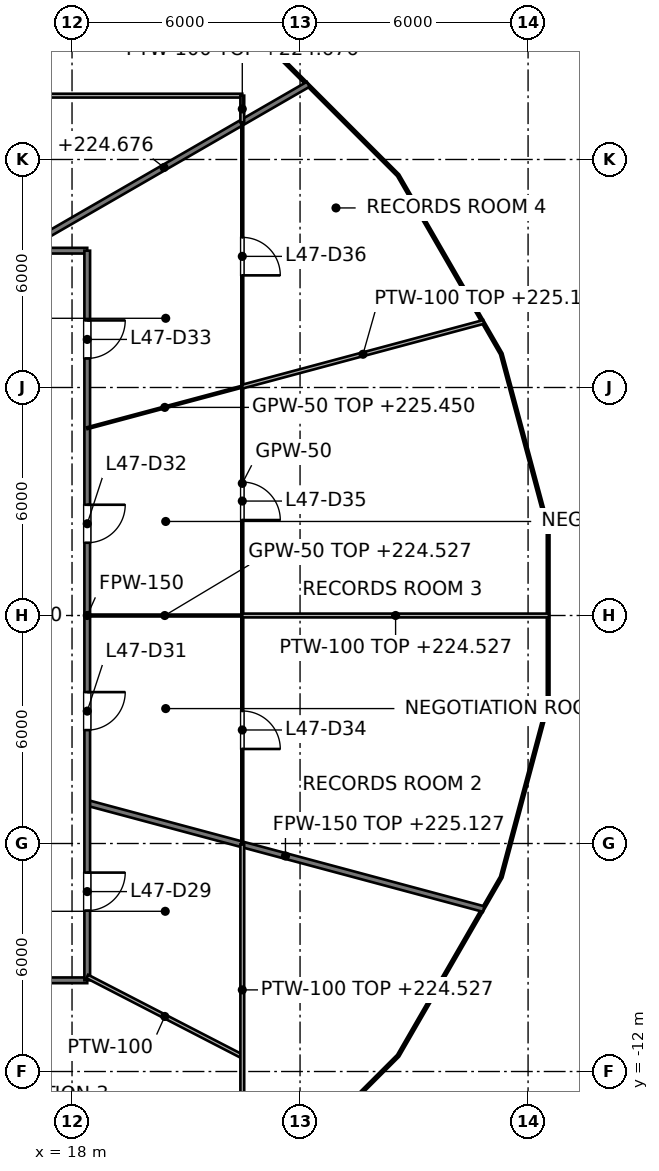
"""IFC4 building model, lengths in metres.
Left out: names, types, materials, properties, quantities, classifications, styles, units other than length and angle.
Written with IfcOpenShell. Run it as: python <this file> out.ifc"""

import sys

from ifc_helpers import new_model, si_unit, direction, frame, frame_2d, origin, place, context, subcontext, project, spatial, rectangle, extrude, element, fill, save


model = new_model("IFC4")
c1 = context("Model", 3, precision=1e-05, world=origin(), true_north=direction((0.0, 1.0)))
c2 = subcontext(c1, "Body", "Model", "MODEL_VIEW")
j1 = project(units=[si_unit("LENGTHUNIT", "METRE"), si_unit("PLANEANGLEUNIT", "RADIAN")], contexts=[c1])
p1 = place(None, origin())
s1 = spatial("IfcSite", under=j1, at=p1, CompositionType="ELEMENT")
p2 = place(p1, origin())
s2 = spatial("IfcBuilding", under=s1, at=p2, CompositionType="ELEMENT")
p3 = place(p2, frame((0.0, 0.0, 221.6)))
s3 = spatial("IfcBuildingStorey", under=s2, at=p3, CompositionType="ELEMENT", Elevation=221.6)
p4 = place(p3, frame((18.4, -4.931, 0.0), z_axis=(0.0, 0.0, 1.0), x_axis=(0.96593412763, -0.25878806209, 0.0)))
e1 = element("IfcWall", 1, at=p4, inside=s3, PredefinedType="PARTITIONING", context=c2, shape_type="SweptSolid", body=[
    extrude(rectangle(XDim=10.8, YDim=0.15, at=frame_2d((5.4, 0.0))), origin(), (0.0, 0.0, 1.0), 3.527),
])
p5 = place(p3, frame((-18.4, -9.6, 0.0), z_axis=(0.0, 0.0, 1.0), x_axis=(1.0, 0.0, 0.0)))
e2 = element("IfcWall", 2, at=p5, inside=s3, PredefinedType="PARTITIONING", context=c2, shape_type="SweptSolid", body=[
    extrude(rectangle(XDim=36.8, YDim=0.15, at=frame_2d((18.4, 0.0))), origin(), (0.0, 0.0, 1.0), 2.927),
])
p6 = place(p5, frame((5.082, 0.0, 0.0)))
e3 = element("IfcOpeningElement", 3, at=p6, cuts=e2, PredefinedType="OPENING", context=c2, shape_type="SweptSolid", body=[
    extrude(rectangle(XDim=1.0, YDim=2.1, at=frame_2d((0.5, 1.05))), frame((0.0, 0.075, 0.0), z_axis=(0.0, -1.0, 0.0), x_axis=(1.0, 0.0, 0.0)), (0.0, 0.0, 1.0), 0.15),
])
p7 = place(p5, frame((11.135, 0.0, 0.0)))
e4 = element("IfcOpeningElement", 4, at=p7, cuts=e2, PredefinedType="OPENING", context=c2, shape_type="SweptSolid", body=[
    extrude(rectangle(XDim=1.0, YDim=2.1, at=frame_2d((0.5, 1.05))), frame((0.0, 0.075, 0.0), z_axis=(0.0, -1.0, 0.0), x_axis=(1.0, 0.0, 0.0)), (0.0, 0.0, 1.0), 0.15),
])
p8 = place(p5, frame((15.588, 0.0, 0.0)))
e5 = element("IfcOpeningElement", 5, at=p8, cuts=e2, PredefinedType="OPENING", context=c2, shape_type="SweptSolid", body=[
    extrude(rectangle(XDim=1.0, YDim=2.1, at=frame_2d((0.5, 1.05))), frame((0.0, 0.075, 0.0), z_axis=(0.0, -1.0, 0.0), x_axis=(1.0, 0.0, 0.0)), (0.0, 0.0, 1.0), 0.15),
])
p9 = place(p5, frame((18.768, 0.0, 0.0)))
e6 = element("IfcOpeningElement", 6, at=p9, cuts=e2, PredefinedType="OPENING", context=c2, shape_type="SweptSolid", body=[
    extrude(rectangle(XDim=1.0, YDim=2.1, at=frame_2d((0.5, 1.05))), frame((0.0, 0.075, 0.0), z_axis=(0.0, -1.0, 0.0), x_axis=(1.0, 0.0, 0.0)), (0.0, 0.0, 1.0), 0.15),
])
p10 = place(p5, frame((27.968, 0.0, 0.0)))
e7 = element("IfcOpeningElement", 7, at=p10, cuts=e2, PredefinedType="OPENING", context=c2, shape_type="SweptSolid", body=[
    extrude(rectangle(XDim=1.0, YDim=2.1, at=frame_2d((0.5, 1.05))), frame((0.0, 0.075, 0.0), z_axis=(0.0, -1.0, 0.0), x_axis=(1.0, 0.0, 0.0)), (0.0, 0.0, 1.0), 0.15),
])
p11 = place(p3, frame((-18.4, 9.6, 0.0), z_axis=(0.0, 0.0, 1.0), x_axis=(1.0, 0.0, 0.0)))
e8 = element("IfcWall", 8, at=p11, inside=s3, PredefinedType="PARTITIONING", context=c2, shape_type="SweptSolid", body=[
    extrude(rectangle(XDim=36.8, YDim=0.15, at=frame_2d((18.4, 0.0))), origin(), (0.0, 0.0, 1.0), 2.927),
])
p12 = place(p11, frame((30.793, 0.0, 0.0)))
e9 = element("IfcOpeningElement", 9, at=p12, cuts=e8, PredefinedType="OPENING", context=c2, shape_type="SweptSolid", body=[
    extrude(rectangle(XDim=1.0, YDim=2.1, at=frame_2d((0.5, 1.05))), frame((0.0, 0.075, 0.0), z_axis=(0.0, -1.0, 0.0), x_axis=(1.0, 0.0, 0.0)), (0.0, 0.0, 1.0), 0.15),
])
p13 = place(p11, frame((24.84, 0.0, 0.0)))
e10 = element("IfcOpeningElement", 10, at=p13, cuts=e8, PredefinedType="OPENING", context=c2, shape_type="SweptSolid", body=[
    extrude(rectangle(XDim=1.0, YDim=2.1, at=frame_2d((0.5, 1.05))), frame((0.0, 0.075, 0.0), z_axis=(0.0, -1.0, 0.0), x_axis=(1.0, 0.0, 0.0)), (0.0, 0.0, 1.0), 0.15),
])
p14 = place(p11, frame((21.106, 0.0, 0.0)))
e11 = element("IfcOpeningElement", 11, at=p14, cuts=e8, PredefinedType="OPENING", context=c2, shape_type="SweptSolid", body=[
    extrude(rectangle(XDim=1.0, YDim=2.1, at=frame_2d((0.5, 1.05))), frame((0.0, 0.075, 0.0), z_axis=(0.0, -1.0, 0.0), x_axis=(1.0, 0.0, 0.0)), (0.0, 0.0, 1.0), 0.15),
])
p15 = place(p11, frame((17.46, 0.0, 0.0)))
e12 = element("IfcOpeningElement", 12, at=p15, cuts=e8, PredefinedType="OPENING", context=c2, shape_type="SweptSolid", body=[
    extrude(rectangle(XDim=1.0, YDim=2.1, at=frame_2d((0.5, 1.05))), frame((0.0, 0.075, 0.0), z_axis=(0.0, -1.0, 0.0), x_axis=(1.0, 0.0, 0.0)), (0.0, 0.0, 1.0), 0.15),
])
p16 = place(p11, frame((13.497, 0.0, 0.0)))
e13 = element("IfcOpeningElement", 13, at=p16, cuts=e8, PredefinedType="OPENING", context=c2, shape_type="SweptSolid", body=[
    extrude(rectangle(XDim=1.0, YDim=2.1, at=frame_2d((0.5, 1.05))), frame((0.0, 0.075, 0.0), z_axis=(0.0, -1.0, 0.0), x_axis=(1.0, 0.0, 0.0)), (0.0, 0.0, 1.0), 0.15),
])
p17 = place(p11, frame((6.418, 0.0, 0.0)))
e14 = element("IfcOpeningElement", 14, at=p17, cuts=e8, PredefinedType="OPENING", context=c2, shape_type="SweptSolid", body=[
    extrude(rectangle(XDim=1.0, YDim=2.1, at=frame_2d((0.5, 1.05))), frame((0.0, 0.075, 0.0), z_axis=(0.0, -1.0, 0.0), x_axis=(1.0, 0.0, 0.0)), (0.0, 0.0, 1.0), 0.15),
])
p18 = place(p3, frame((16.628, 9.6, 0.0), z_axis=(0.0, 0.0, 1.0), x_axis=(0.86607559881, 0.499913049585, 0.0)))
e15 = element("IfcWall", 15, at=p18, inside=s3, PredefinedType="PARTITIONING", context=c2, shape_type="SweptSolid", body=[
    extrude(rectangle(XDim=8.76, YDim=0.15, at=frame_2d((4.38, 0.0))), origin(), (0.0, 0.0, 1.0), 3.076),
])
p19 = place(p3, frame((18.4, -9.6, 0.0), z_axis=(0.0, 0.0, 1.0), x_axis=(0.0, 1.0, 0.0)))
e16 = element("IfcWall", 16, at=p19, inside=s3, PredefinedType="PARTITIONING", context=c2, shape_type="SweptSolid", body=[
    extrude(rectangle(XDim=19.2, YDim=0.15, at=frame_2d((9.6, 0.0))), origin(), (0.0, 0.0, 1.0), 2.918),
])
p20 = place(p19, frame((1.834, 0.0, 0.0)))
e17 = element("IfcOpeningElement", 17, at=p20, cuts=e16, PredefinedType="OPENING", context=c2, shape_type="SweptSolid", body=[
    extrude(rectangle(XDim=1.0, YDim=2.1, at=frame_2d((0.5, 1.05))), frame((0.0, 0.075, 0.0), z_axis=(0.0, -1.0, 0.0), x_axis=(1.0, 0.0, 0.0)), (0.0, 0.0, 1.0), 0.15),
])
p21 = place(p19, frame((6.584, 0.0, 0.0)))
e18 = element("IfcOpeningElement", 18, at=p21, cuts=e16, PredefinedType="OPENING", context=c2, shape_type="SweptSolid", body=[
    extrude(rectangle(XDim=1.0, YDim=2.1, at=frame_2d((0.5, 1.05))), frame((0.0, 0.075, 0.0), z_axis=(0.0, -1.0, 0.0), x_axis=(1.0, 0.0, 0.0)), (0.0, 0.0, 1.0), 0.15),
])
p22 = place(p19, frame((11.514, 0.0, 0.0)))
e19 = element("IfcOpeningElement", 19, at=p22, cuts=e16, PredefinedType="OPENING", context=c2, shape_type="SweptSolid", body=[
    extrude(rectangle(XDim=1.0, YDim=2.1, at=frame_2d((0.5, 1.05))), frame((0.0, 0.075, 0.0), z_axis=(0.0, -1.0, 0.0), x_axis=(1.0, 0.0, 0.0)), (0.0, 0.0, 1.0), 0.15),
])
p23 = place(p19, frame((16.365, 0.0, 0.0)))
e20 = element("IfcOpeningElement", 20, at=p23, cuts=e16, PredefinedType="OPENING", context=c2, shape_type="SweptSolid", body=[
    extrude(rectangle(XDim=1.0, YDim=2.1, at=frame_2d((0.5, 1.05))), frame((0.0, 0.075, 0.0), z_axis=(0.0, -1.0, 0.0), x_axis=(1.0, 0.0, 0.0)), (0.0, 0.0, 1.0), 0.15),
])
p24 = place(p3, frame((18.4, 0.0, 0.0), z_axis=(0.0, 0.0, 1.0), x_axis=(0.999999971356, -0.000239348964, 0.0)))
e21 = element("IfcWall", 21, at=p24, inside=s3, PredefinedType="PARTITIONING", context=c2, shape_type="SweptSolid", body=[
    extrude(rectangle(XDim=4.08, YDim=0.05, at=frame_2d((2.04, 0.0))), origin(), (0.0, 0.0, 1.0), 2.927),
])
p25 = place(p3, frame((18.4, 4.93, 0.0), z_axis=(0.0, 0.0, 1.0), x_axis=(0.965939796444, 0.258766902147, 0.0)))
e22 = element("IfcWall", 22, at=p25, inside=s3, PredefinedType="PARTITIONING", context=c2, shape_type="SweptSolid", body=[
    extrude(rectangle(XDim=4.224, YDim=0.05, at=frame_2d((2.112, 0.0))), origin(), (0.0, 0.0, 1.0), 3.85),
])
p26 = place(p3, frame((22.48, -6.024, 0.0), z_axis=(0.0, 0.0, 1.0), x_axis=(0.0, 1.0, 0.0)))
e23 = element("IfcWall", 23, at=p26, inside=s3, PredefinedType="PARTITIONING", context=c2, shape_type="SweptSolid", body=[
    extrude(rectangle(XDim=19.003, YDim=0.05, at=frame_2d((9.501, 0.0))), origin(), (0.0, 0.0, 1.0), 2.918),
])
p27 = place(p26, frame((2.511, 0.0, 0.0)))
e24 = element("IfcOpeningElement", 24, at=p27, cuts=e23, PredefinedType="OPENING", context=c2, shape_type="SweptSolid", body=[
    extrude(rectangle(XDim=1.0, YDim=2.1, at=frame_2d((0.5, 1.05))), frame((0.0, 0.025, 0.0), z_axis=(0.0, -1.0, 0.0), x_axis=(1.0, 0.0, 0.0)), (0.0, 0.0, 1.0), 0.05),
])
p28 = place(p26, frame((8.535, 0.0, 0.0)))
e25 = element("IfcOpeningElement", 25, at=p28, cuts=e23, PredefinedType="OPENING", context=c2, shape_type="SweptSolid", body=[
    extrude(rectangle(XDim=1.0, YDim=2.1, at=frame_2d((0.5, 1.05))), frame((0.0, 0.025, 0.0), z_axis=(0.0, -1.0, 0.0), x_axis=(1.0, 0.0, 0.0)), (0.0, 0.0, 1.0), 0.05),
])
p29 = place(p26, frame((14.974, 0.0, 0.0)))
e26 = element("IfcOpeningElement", 26, at=p29, cuts=e23, PredefinedType="OPENING", context=c2, shape_type="SweptSolid", body=[
    extrude(rectangle(XDim=1.0, YDim=2.1, at=frame_2d((0.5, 1.05))), frame((0.0, 0.025, 0.0), z_axis=(0.0, -1.0, 0.0), x_axis=(1.0, 0.0, 0.0)), (0.0, 0.0, 1.0), 0.05),
])
p30 = place(p3, frame((18.4, -9.498, 0.0), z_axis=(0.0, 0.0, 1.0), x_axis=(0.888610870054, -0.458661881587, 0.0)))
e27 = element("IfcWall", 27, at=p30, inside=s3, PredefinedType="PARTITIONING", context=c2, shape_type="SweptSolid", body=[
    extrude(rectangle(XDim=4.592, YDim=0.1, at=frame_2d((2.296, 0.0))), origin(), (0.0, 0.0, 1.0), 3.85),
])
p31 = place(p3, frame((22.48, 0.0, 0.0), z_axis=(0.0, 0.0, 1.0), x_axis=(1.0, 0.0, 0.0)))
e28 = element("IfcWall", 28, at=p31, inside=s3, PredefinedType="PARTITIONING", context=c2, shape_type="SweptSolid", body=[
    extrude(rectangle(XDim=8.068, YDim=0.1, at=frame_2d((4.034, 0.0))), origin(), (0.0, 0.0, 1.0), 2.927),
])
p32 = place(p3, frame((-22.48, 13.68, 0.0), z_axis=(0.0, 0.0, 1.0), x_axis=(1.0, 0.0, 0.0)))
e29 = element("IfcWall", 29, at=p32, inside=s3, PredefinedType="PARTITIONING", context=c2, shape_type="SweptSolid", body=[
    extrude(rectangle(XDim=44.96, YDim=0.1, at=frame_2d((22.48, 0.0))), origin(), (0.0, 0.0, 1.0), 2.927),
])
p33 = place(p32, frame((20.954, 0.0, 0.0)))
e30 = element("IfcOpeningElement", 30, at=p33, cuts=e29, PredefinedType="OPENING", context=c2, shape_type="SweptSolid", body=[
    extrude(rectangle(XDim=1.8, YDim=2.1, at=frame_2d((0.9, 1.05))), frame((0.0, 0.05, 0.0), z_axis=(0.0, -1.0, 0.0), x_axis=(1.0, 0.0, 0.0)), (0.0, 0.0, 1.0), 0.1),
])
p34 = place(p32, frame((6.348, 0.0, 0.0)))
e31 = element("IfcOpeningElement", 31, at=p34, cuts=e29, PredefinedType="OPENING", context=c2, shape_type="SweptSolid", body=[
    extrude(rectangle(XDim=0.9, YDim=2.1, at=frame_2d((0.45, 1.05))), frame((0.0, 0.05, 0.0), z_axis=(0.0, -1.0, 0.0), x_axis=(1.0, 0.0, 0.0)), (0.0, 0.0, 1.0), 0.1),
])
p35 = place(p3, frame((22.48, 6.023, 0.0), z_axis=(0.0, 0.0, 1.0), x_axis=(0.965884068963, 0.25897483531, 0.0)))
e32 = element("IfcWall", 32, at=p35, inside=s3, PredefinedType="PARTITIONING", context=c2, shape_type="SweptSolid", body=[
    extrude(rectangle(XDim=6.576, YDim=0.1, at=frame_2d((3.288, 0.0))), origin(), (0.0, 0.0, 1.0), 3.527),
])
p36 = place(p3, frame((22.48, -13.68, 0.0), z_axis=(0.0, 0.0, 1.0), x_axis=(0.0, 1.0, 0.0)))
e33 = element("IfcWall", 33, at=p36, inside=s3, PredefinedType="PARTITIONING", context=c2, shape_type="SweptSolid", body=[
    extrude(rectangle(XDim=7.656, YDim=0.1, at=frame_2d((3.828, 0.0))), origin(), (0.0, 0.0, 1.0), 2.927),
])
p37 = place(p3, frame((22.48, 12.979, 0.0), z_axis=(0.0, 0.0, 1.0), x_axis=(0.0, 1.0, 0.0)))
e34 = element("IfcWall", 34, at=p37, inside=s3, PredefinedType="PARTITIONING", context=c2, shape_type="SweptSolid", body=[
    extrude(rectangle(XDim=0.701, YDim=0.1, at=frame_2d((0.351, 0.0))), origin(), (0.0, 0.0, 1.0), 3.076),
])
p38 = place(p20, origin())
e35 = element("IfcDoor", 35, at=p38, inside=s3, OperationType="SINGLE_SWING_RIGHT", PredefinedType="DOOR", context=c2, shape_type="SweptSolid", body=[
    extrude(rectangle(XDim=1.0, YDim=2.1, at=frame_2d((0.5, 1.05))), frame((0.0, 0.025, 0.0), z_axis=(0.0, -1.0, 0.0), x_axis=(1.0, 0.0, 0.0)), (0.0, 0.0, 1.0), 0.05),
])
fill(e17, e35)
p39 = place(p21, origin())
e36 = element("IfcDoor", 36, at=p39, inside=s3, OperationType="SINGLE_SWING_RIGHT", PredefinedType="DOOR", context=c2, shape_type="SweptSolid", body=[
    extrude(rectangle(XDim=1.0, YDim=2.1, at=frame_2d((0.5, 1.05))), frame((0.0, 0.025, 0.0), z_axis=(0.0, -1.0, 0.0), x_axis=(1.0, 0.0, 0.0)), (0.0, 0.0, 1.0), 0.05),
])
fill(e18, e36)
p40 = place(p22, origin())
e37 = element("IfcDoor", 37, at=p40, inside=s3, OperationType="SINGLE_SWING_RIGHT", PredefinedType="DOOR", context=c2, shape_type="SweptSolid", body=[
    extrude(rectangle(XDim=1.0, YDim=2.1, at=frame_2d((0.5, 1.05))), frame((0.0, 0.025, 0.0), z_axis=(0.0, -1.0, 0.0), x_axis=(1.0, 0.0, 0.0)), (0.0, 0.0, 1.0), 0.05),
])
fill(e19, e37)
p41 = place(p23, origin())
e38 = element("IfcDoor", 38, at=p41, inside=s3, OperationType="SINGLE_SWING_RIGHT", PredefinedType="DOOR", context=c2, shape_type="SweptSolid", body=[
    extrude(rectangle(XDim=1.0, YDim=2.1, at=frame_2d((0.5, 1.05))), frame((0.0, 0.025, 0.0), z_axis=(0.0, -1.0, 0.0), x_axis=(1.0, 0.0, 0.0)), (0.0, 0.0, 1.0), 0.05),
])
fill(e20, e38)
p42 = place(p27, origin())
e39 = element("IfcDoor", 39, at=p42, inside=s3, OperationType="SINGLE_SWING_LEFT", PredefinedType="DOOR", context=c2, shape_type="SweptSolid", body=[
    extrude(rectangle(XDim=1.0, YDim=2.1, at=frame_2d((0.5, 1.05))), frame((0.0, 0.025, 0.0), z_axis=(0.0, -1.0, 0.0), x_axis=(1.0, 0.0, 0.0)), (0.0, 0.0, 1.0), 0.05),
])
fill(e24, e39)
p43 = place(p28, origin())
e40 = element("IfcDoor", 40, at=p43, inside=s3, OperationType="SINGLE_SWING_LEFT", PredefinedType="DOOR", context=c2, shape_type="SweptSolid", body=[
    extrude(rectangle(XDim=1.0, YDim=2.1, at=frame_2d((0.5, 1.05))), frame((0.0, 0.025, 0.0), z_axis=(0.0, -1.0, 0.0), x_axis=(1.0, 0.0, 0.0)), (0.0, 0.0, 1.0), 0.05),
])
fill(e25, e40)
p44 = place(p29, origin())
e41 = element("IfcDoor", 41, at=p44, inside=s3, OperationType="SINGLE_SWING_LEFT", PredefinedType="DOOR", context=c2, shape_type="SweptSolid", body=[
    extrude(rectangle(XDim=1.0, YDim=2.1, at=frame_2d((0.5, 1.05))), frame((0.0, 0.025, 0.0), z_axis=(0.0, -1.0, 0.0), x_axis=(1.0, 0.0, 0.0)), (0.0, 0.0, 1.0), 0.05),
])
fill(e26, e41)
save(model, sys.argv[1])
